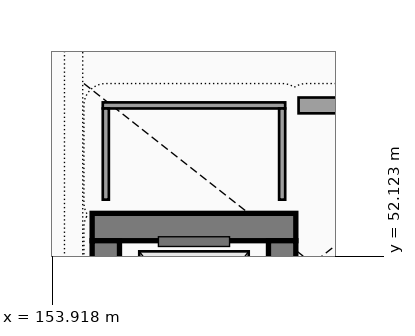
"""IFC4 building model, lengths in metres.
Left out: names, types, materials, properties, quantities, classifications, styles, units other than length and angle.
Written with IfcOpenShell. Run it as: python <this file> out.ifc"""

import sys

from ifc_helpers import new_model, si_unit, direction, frame, frame_2d, origin, place, context, subcontext, project, spatial, rectangle, extrude, element, save


model = new_model("IFC4")
c1 = context("Model", 3, precision=1e-05, world=origin(), true_north=direction((0.0, 1.0)))
c2 = subcontext(c1, "Body", "Model", "MODEL_VIEW")
j1 = project(units=[si_unit("LENGTHUNIT", "METRE"), si_unit("PLANEANGLEUNIT", "RADIAN")], contexts=[c1])
p1 = place(None, origin())
s1 = spatial("IfcSite", under=j1, at=p1, CompositionType="ELEMENT")
p2 = place(p1, origin())
s2 = spatial("IfcBuilding", under=s1, at=p2, CompositionType="ELEMENT")
p3 = place(p2, frame((0.0, 0.0, -4.8)))
s3 = spatial("IfcBuildingStorey", under=s2, at=p3, CompositionType="ELEMENT", Elevation=-4.8)
p4 = place(p3, frame((157.925, 52.6, 0.0), z_axis=(0.0, 0.0, 1.0), x_axis=(-1.0, 0.0, 0.0)))
e1 = element("IfcWall", 1, at=p4, inside=s3, PredefinedType="SHEAR", context=c2, shape_type="SweptSolid", body=[
    extrude(rectangle(XDim=3.35, YDim=0.45, at=frame_2d((1.675, 0.0))), origin(), (0.0, 0.0, 1.0), 4.5),
])
p5 = place(p3, frame((154.8, 52.375, 0.0), z_axis=(0.0, 0.0, 1.0), x_axis=(0.0, -1.0, 0.0)))
e2 = element("IfcWall", 2, at=p5, inside=s3, PredefinedType="SHEAR", context=c2, shape_type="SweptSolid", body=[
    extrude(rectangle(XDim=2.75, YDim=0.45, at=frame_2d((1.375, 0.0))), origin(), (0.0, 0.0, 1.0), 4.5),
])
p6 = place(p3, frame((157.7, 49.625, 0.0), z_axis=(0.0, 0.0, 1.0), x_axis=(0.0, 1.0, 0.0)))
e3 = element("IfcWall", 3, at=p6, inside=s3, PredefinedType="SHEAR", context=c2, shape_type="SweptSolid", body=[
    extrude(rectangle(XDim=2.75, YDim=0.45, at=frame_2d((1.375, 0.0))), origin(), (0.0, 0.0, 1.0), 4.5),
])
p7 = place(p6, frame((0.725, 0.0, 0.0), z_axis=(0.0, 0.0, 1.0), x_axis=(1.0, 0.0, 0.0)))
e4 = element("IfcOpeningElement", 4, at=p7, cuts=e3, PredefinedType="OPENING", context=c2, shape_type="SweptSolid", body=[
    extrude(rectangle(XDim=1.3, YDim=2.25, at=frame_2d((0.65, 1.125))), frame((0.0, 0.235, 0.0), z_axis=(0.0, -1.0, 0.0), x_axis=(1.0, 0.0, 0.0)), (0.0, 0.0, 1.0), 0.47),
])
p8 = place(p3, frame((157.75, 54.6, 0.0), z_axis=(0.0, 0.0, 1.0), x_axis=(-1.0, 0.0, 0.0)))
e5 = element("IfcWall", 5, at=p8, inside=s3, PredefinedType="PARTITIONING", context=c2, shape_type="SweptSolid", body=[
    extrude(rectangle(XDim=3.0, YDim=0.1, at=frame_2d((1.5, 0.0))), origin(), (0.0, 0.0, 1.0), 4.5),
])
for number, where, z_axis, x_axis in (
    (6, (154.8, 54.55, 0.0), (0.0, 0.0, 1.0), (0.0, -1.0, 0.0)),
    (7, (157.7, 53.05, 0.0), (0.0, 0.0, 1.0), (0.0, 1.0, 0.0)),
):
    element("IfcWall", number, at=place(p3, frame(where, z_axis=z_axis, x_axis=x_axis)), inside=s3, PredefinedType="PARTITIONING", context=c2, shape_type="SweptSolid", body=[
        extrude(rectangle(XDim=1.5, YDim=0.1, at=frame_2d((0.75, 0.0))), origin(), (0.0, 0.0, 1.0), 4.5),
    ])
p9 = place(p3, frame((161.73, 54.6, 0.0), z_axis=(0.0, 0.0, 1.0), x_axis=(-1.0, 0.0, 0.0)))
e8 = element("IfcWall", 8, at=p9, inside=s3, PredefinedType="SOLIDWALL", context=c2, shape_type="SweptSolid", body=[
    extrude(rectangle(XDim=3.76, YDim=0.26, at=frame_2d((1.88, 0.0))), origin(), (0.0, 0.0, 1.0), 4.5),
])
p10 = place(p9, frame((2.805, 0.0, 0.0), z_axis=(0.0, 0.0, 1.0), x_axis=(-1.0, 0.0, 0.0)))
e9 = element("IfcOpeningElement", 9, at=p10, cuts=e8, PredefinedType="OPENING", context=c2, shape_type="SweptSolid", body=[
    extrude(rectangle(XDim=1.85, YDim=2.25, at=frame_2d((0.925, 1.125))), frame((0.0, 0.14, 0.0), z_axis=(0.0, -1.0, 0.0), x_axis=(1.0, 0.0, 0.0)), (0.0, 0.0, 1.0), 0.28),
])
save(model, sys.argv[1])
